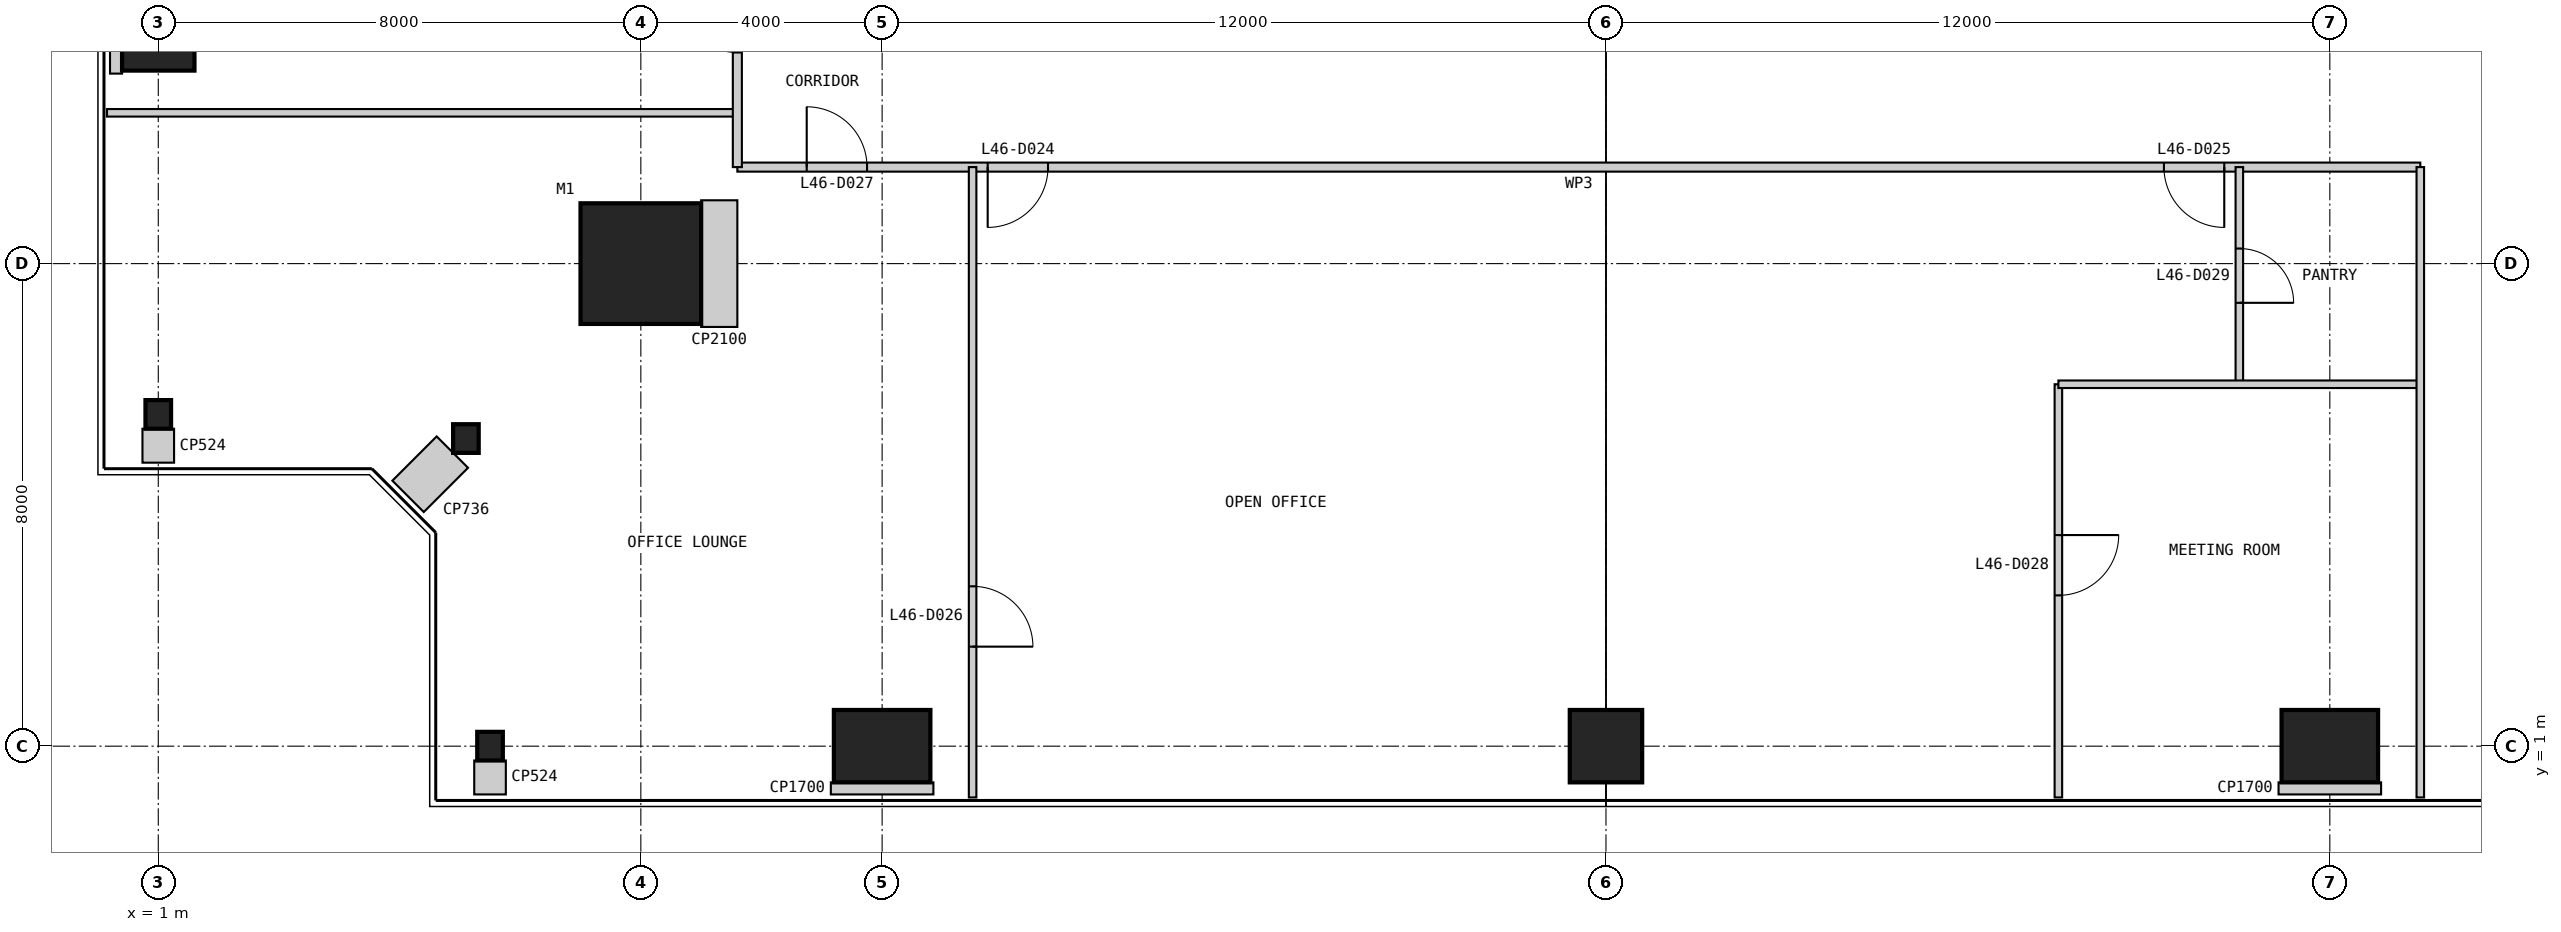
"""IFC4 building model, lengths in metres.
Left out: names, types, materials, properties, quantities, classifications, styles, units other than length and angle.
Written with IfcOpenShell. Run it as: python <this file> out.ifc"""

import sys

from ifc_helpers import new_model, si_unit, direction, frame, frame_2d, origin, origin_2d, place, context, subcontext, project, spatial, rectangle, i_section, extrude, element, fill, save


model = new_model("IFC4")
c1 = context("Model", 3, precision=1e-05, world=origin(), true_north=direction((0.0, 1.0)))
c2 = subcontext(c1, "Body", "Model", "MODEL_VIEW")
j1 = project(units=[si_unit("LENGTHUNIT", "METRE"), si_unit("PLANEANGLEUNIT", "RADIAN")], contexts=[c1])
p1 = place(None, origin())
s1 = spatial("IfcSite", under=j1, at=p1, CompositionType="ELEMENT")
p2 = place(p1, origin())
s2 = spatial("IfcBuilding", under=s1, at=p2, CompositionType="ELEMENT")
p3 = place(p2, frame((0.0, 0.0, 197.8)))
s3 = spatial("IfcBuildingStorey", under=s2, at=p3, CompositionType="ELEMENT", Elevation=197.8)
p4 = place(p3, frame((9.0, 9.0, 0.0), z_axis=(0.0, 0.0, 1.0), x_axis=(1.0, 0.0, 0.0)))
e1 = element("IfcColumn", 1, at=p4, inside=s3, PredefinedType="COLUMN", context=c2, shape_type="SweptSolid", body=[
    extrude(rectangle(XDim=2.0, YDim=2.0, at=origin_2d()), origin(), (0.0, 0.0, 1.0), 4.0),
])
p5 = place(p3, frame((6.5, 1.0, 0.0), z_axis=(0.0, 0.0, 1.0), x_axis=(1.0, 0.0, 0.0)))
e2 = element("IfcColumn", 2, at=p5, inside=s3, PredefinedType="COLUMN", context=c2, shape_type="SweptSolid", body=[
    extrude(i_section(OverallWidth=0.424, OverallDepth=0.475, WebThickness=0.048, FlangeThickness=0.077, at=origin_2d()), origin(), (0.0, 0.0, 1.0), 4.0),
])
p6 = place(p3, frame((13.0, 1.0, 0.0), z_axis=(0.0, 0.0, 1.0), x_axis=(1.0, 0.0, 0.0)))
e3 = element("IfcColumn", 3, at=p6, inside=s3, PredefinedType="COLUMN", context=c2, shape_type="SweptSolid", body=[
    extrude(rectangle(XDim=1.6, YDim=1.2, at=origin_2d()), origin(), (0.0, 0.0, 1.0), 4.0),
])
p7 = place(p3, frame((25.0, 1.0, 0.0), z_axis=(0.0, 0.0, 1.0), x_axis=(1.0, 0.0, 0.0)))
e4 = element("IfcColumn", 4, at=p7, inside=s3, PredefinedType="COLUMN", context=c2, shape_type="SweptSolid", body=[
    extrude(rectangle(XDim=1.2, YDim=1.2, at=origin_2d()), origin(), (0.0, 0.0, 1.0), 4.0),
])
p8 = place(p3, frame((37.0, 1.0, 0.0), z_axis=(0.0, 0.0, 1.0), x_axis=(1.0, 0.0, 0.0)))
e5 = element("IfcColumn", 5, at=p8, inside=s3, PredefinedType="COLUMN", context=c2, shape_type="SweptSolid", body=[
    extrude(rectangle(XDim=1.6, YDim=1.2, at=origin_2d()), origin(), (0.0, 0.0, 1.0), 4.0),
])
p9 = place(p3, frame((1.0, 13.0, 0.0), z_axis=(0.0, 0.0, 1.0), x_axis=(1.0, 0.0, 0.0)))
e6 = element("IfcColumn", 6, at=p9, inside=s3, PredefinedType="COLUMN", context=c2, shape_type="SweptSolid", body=[
    extrude(rectangle(XDim=1.2, YDim=1.6, at=origin_2d()), origin(), (0.0, 0.0, 1.0), 4.0),
])
for number, where, z_axis, x_axis in (
    (7, (1.0, 6.5, 0.0), (0.0, 0.0, 1.0), (1.0, 0.0, 0.0)),
    (8, (6.1, 6.1, 0.0), (0.0, 0.0, 1.0), (1.0, 0.0, 0.0)),
):
    element("IfcColumn", number, at=place(p3, frame(where, z_axis=z_axis, x_axis=x_axis)), inside=s3, PredefinedType="COLUMN", context=c2, shape_type="SweptSolid", body=[
        extrude(i_section(OverallWidth=0.424, OverallDepth=0.475, WebThickness=0.048, FlangeThickness=0.077, at=origin_2d()), origin(), (0.0, 0.0, 1.0), 4.0),
    ])
p10 = place(p3, frame((10.6, 10.6, 0.0), z_axis=(0.0, 0.0, 1.0), x_axis=(1.0, 0.0, 0.0)))
e9 = element("IfcWall", 9, at=p10, inside=s3, PredefinedType="PARTITIONING", context=c2, shape_type="SweptSolid", body=[
    extrude(rectangle(XDim=27.9, YDim=0.15, at=frame_2d((13.95, 0.0))), origin(), (0.0, 0.0, 1.0), 3.85),
])
p11 = place(p10, frame((4.15, 0.0, 0.0)))
e10 = element("IfcOpeningElement", 10, at=p11, cuts=e9, PredefinedType="OPENING", context=c2, shape_type="SweptSolid", body=[
    extrude(rectangle(XDim=1.0, YDim=2.2, at=frame_2d((0.5, 1.1))), frame((0.0, 0.085, 0.0), z_axis=(0.0, -1.0, 0.0), x_axis=(1.0, 0.0, 0.0)), (0.0, 0.0, 1.0), 0.17),
])
p12 = place(p10, frame((23.65, 0.0, 0.0)))
e11 = element("IfcOpeningElement", 11, at=p12, cuts=e9, PredefinedType="OPENING", context=c2, shape_type="SweptSolid", body=[
    extrude(rectangle(XDim=1.0, YDim=2.2, at=frame_2d((0.5, 1.1))), frame((0.0, 0.085, 0.0), z_axis=(0.0, -1.0, 0.0), x_axis=(1.0, 0.0, 0.0)), (0.0, 0.0, 1.0), 0.17),
])
p13 = place(p10, frame((1.15, 0.0, 0.0)))
e12 = element("IfcOpeningElement", 12, at=p13, cuts=e9, PredefinedType="OPENING", context=c2, shape_type="SweptSolid", body=[
    extrude(rectangle(XDim=1.0, YDim=2.2, at=frame_2d((0.5, 1.1))), frame((0.0, 0.085, 0.0), z_axis=(0.0, -1.0, 0.0), x_axis=(1.0, 0.0, 0.0)), (0.0, 0.0, 1.0), 0.17),
])
p14 = place(p3, frame((0.15, 11.5, 0.0), z_axis=(0.0, 0.0, 1.0), x_axis=(1.0, 0.0, 0.0)))
e13 = element("IfcWall", 13, at=p14, inside=s3, PredefinedType="PARTITIONING", context=c2, shape_type="SweptSolid", body=[
    extrude(rectangle(XDim=10.45, YDim=0.125, at=frame_2d((5.225, 0.0))), origin(), (0.0, 0.0, 1.0), 3.85),
])
p15 = place(p3, frame((14.5, 0.15, 0.0), z_axis=(0.0, 0.0, 1.0), x_axis=(0.0, 1.0, 0.0)))
e14 = element("IfcWall", 14, at=p15, inside=s3, PredefinedType="PARTITIONING", context=c2, shape_type="SweptSolid", body=[
    extrude(rectangle(XDim=10.45, YDim=0.125, at=frame_2d((5.225, 0.0))), origin(), (0.0, 0.0, 1.0), 3.85),
])
p16 = place(p15, frame((2.5, 0.0, 0.0)))
e15 = element("IfcOpeningElement", 15, at=p16, cuts=e14, PredefinedType="OPENING", context=c2, shape_type="SweptSolid", body=[
    extrude(rectangle(XDim=1.0, YDim=2.2, at=frame_2d((0.5, 1.1))), frame((0.0, 0.073, 0.0), z_axis=(0.0, -1.0, 0.0), x_axis=(1.0, 0.0, 0.0)), (0.0, 0.0, 1.0), 0.145),
])
p17 = place(p3, frame((32.5, 0.15, 0.0), z_axis=(0.0, 0.0, 1.0), x_axis=(0.0, 1.0, 0.0)))
e16 = element("IfcWall", 16, at=p17, inside=s3, PredefinedType="PARTITIONING", context=c2, shape_type="SweptSolid", body=[
    extrude(rectangle(XDim=6.85, YDim=0.125, at=frame_2d((3.425, 0.0))), origin(), (0.0, 0.0, 1.0), 3.85),
])
p18 = place(p17, frame((3.35, 0.0, 0.0)))
e17 = element("IfcOpeningElement", 17, at=p18, cuts=e16, PredefinedType="OPENING", context=c2, shape_type="SweptSolid", body=[
    extrude(rectangle(XDim=1.0, YDim=2.2, at=frame_2d((0.5, 1.1))), frame((0.0, 0.073, 0.0), z_axis=(0.0, -1.0, 0.0), x_axis=(1.0, 0.0, 0.0)), (0.0, 0.0, 1.0), 0.145),
])
p19 = place(p3, frame((35.5, 7.0, 0.0), z_axis=(0.0, 0.0, 1.0), x_axis=(0.0, 1.0, 0.0)))
e18 = element("IfcWall", 18, at=p19, inside=s3, PredefinedType="PARTITIONING", context=c2, shape_type="SweptSolid", body=[
    extrude(rectangle(XDim=3.6, YDim=0.125, at=frame_2d((1.8, 0.0))), origin(), (0.0, 0.0, 1.0), 3.85),
])
p20 = place(p19, frame((1.35, 0.0, 0.0)))
e19 = element("IfcOpeningElement", 19, at=p20, cuts=e18, PredefinedType="OPENING", context=c2, shape_type="SweptSolid", body=[
    extrude(rectangle(XDim=0.9, YDim=2.2, at=frame_2d((0.45, 1.1))), frame((0.0, 0.073, 0.0), z_axis=(0.0, -1.0, 0.0), x_axis=(1.0, 0.0, 0.0)), (0.0, 0.0, 1.0), 0.145),
])
p21 = place(p3, frame((32.5, 7.0, 0.0), z_axis=(0.0, 0.0, 1.0), x_axis=(1.0, 0.0, 0.0)))
e20 = element("IfcWall", 20, at=p21, inside=s3, PredefinedType="PARTITIONING", context=c2, shape_type="SweptSolid", body=[
    extrude(rectangle(XDim=6.0, YDim=0.125, at=frame_2d((3.0, 0.0))), origin(), (0.0, 0.0, 1.0), 3.85),
])
p22 = place(p3, frame((38.5, 0.15, 0.0), z_axis=(0.0, 0.0, 1.0), x_axis=(0.0, 1.0, 0.0)))
e21 = element("IfcWall", 21, at=p22, inside=s3, PredefinedType="PARTITIONING", context=c2, shape_type="SweptSolid", body=[
    extrude(rectangle(XDim=10.45, YDim=0.125, at=frame_2d((5.225, 0.0))), origin(), (0.0, 0.0, 1.0), 3.85),
])
p23 = place(p3, frame((10.6, 39.4, 0.0), z_axis=(0.0, 0.0, 1.0), x_axis=(0.0, -1.0, 0.0)))
e22 = element("IfcWall", 22, at=p23, inside=s3, PredefinedType="PARTITIONING", context=c2, shape_type="SweptSolid", body=[
    extrude(rectangle(XDim=28.8, YDim=0.15, at=frame_2d((14.4, 0.0))), origin(), (0.0, 0.0, 1.0), 3.85),
])
p24 = place(p23, frame((10.15, 0.0, 0.0)))
e23 = element("IfcOpeningElement", 23, at=p24, cuts=e22, PredefinedType="OPENING", context=c2, shape_type="SweptSolid", body=[
    extrude(rectangle(XDim=1.0, YDim=2.2, at=frame_2d((0.5, 1.1))), frame((0.0, 0.085, 0.0), z_axis=(0.0, -1.0, 0.0), x_axis=(1.0, 0.0, 0.0)), (0.0, 0.0, 1.0), 0.17),
])
p25 = place(p23, frame((17.65, 0.0, 0.0)))
e24 = element("IfcOpeningElement", 24, at=p25, cuts=e22, PredefinedType="OPENING", context=c2, shape_type="SweptSolid", body=[
    extrude(rectangle(XDim=1.0, YDim=2.2, at=frame_2d((0.5, 1.1))), frame((0.0, 0.085, 0.0), z_axis=(0.0, -1.0, 0.0), x_axis=(1.0, 0.0, 0.0)), (0.0, 0.0, 1.0), 0.17),
])
p26 = place(p23, frame((4.9, 0.0, 0.0)))
e25 = element("IfcOpeningElement", 25, at=p26, cuts=e22, PredefinedType="OPENING", context=c2, shape_type="SweptSolid", body=[
    extrude(rectangle(XDim=1.0, YDim=2.2, at=frame_2d((0.5, 1.1))), frame((0.0, 0.085, 0.0), z_axis=(0.0, -1.0, 0.0), x_axis=(1.0, 0.0, 0.0)), (0.0, 0.0, 1.0), 0.17),
])
p27 = place(p23, frame((22.9, 0.0, 0.0)))
e26 = element("IfcOpeningElement", 26, at=p27, cuts=e22, PredefinedType="OPENING", context=c2, shape_type="SweptSolid", body=[
    extrude(rectangle(XDim=1.0, YDim=2.2, at=frame_2d((0.5, 1.1))), frame((0.0, 0.085, 0.0), z_axis=(0.0, -1.0, 0.0), x_axis=(1.0, 0.0, 0.0)), (0.0, 0.0, 1.0), 0.17),
])
p28 = place(p23, frame((25.9, 0.0, 0.0)))
e27 = element("IfcOpeningElement", 27, at=p28, cuts=e22, PredefinedType="OPENING", context=c2, shape_type="SweptSolid", body=[
    extrude(rectangle(XDim=1.0, YDim=2.2, at=frame_2d((0.5, 1.1))), frame((0.0, 0.085, 0.0), z_axis=(0.0, -1.0, 0.0), x_axis=(1.0, 0.0, 0.0)), (0.0, 0.0, 1.0), 0.17),
])
p29 = place(p3, frame((10.6, 9.0, 0.0), z_axis=(0.0, 0.0, 1.0), x_axis=(-1.0, 0.0, 0.0)))
e28 = element("IfcWall", 28, at=p29, inside=s3, PredefinedType="PARTITIONING", context=c2, shape_type="SweptSolid", body=[
    extrude(rectangle(XDim=0.6, YDim=2.1, at=frame_2d((0.3, 0.0))), origin(), (0.0, 0.0, 1.0), 3.85),
])
p30 = place(p3, frame((6.5, 0.2, 0.0), z_axis=(0.0, 0.0, 1.0), x_axis=(0.0, 1.0, 0.0)))
e29 = element("IfcWall", 29, at=p30, inside=s3, PredefinedType="PARTITIONING", context=c2, shape_type="SweptSolid", body=[
    extrude(rectangle(XDim=0.562, YDim=0.524, at=frame_2d((0.281, 0.0))), origin(), (0.0, 0.0, 1.0), 3.85),
])
p31 = place(p3, frame((13.0, 0.2, 0.0), z_axis=(0.0, 0.0, 1.0), x_axis=(0.0, 1.0, 0.0)))
e30 = element("IfcWall", 30, at=p31, inside=s3, PredefinedType="PARTITIONING", context=c2, shape_type="SweptSolid", body=[
    extrude(rectangle(XDim=0.2, YDim=1.7, at=frame_2d((0.1, 0.0))), origin(), (0.0, 0.0, 1.0), 3.85),
])
p32 = place(p3, frame((1.0, 5.7, 0.0), z_axis=(0.0, 0.0, 1.0), x_axis=(0.0, 1.0, 0.0)))
e31 = element("IfcWall", 31, at=p32, inside=s3, PredefinedType="PARTITIONING", context=c2, shape_type="SweptSolid", body=[
    extrude(rectangle(XDim=0.562, YDim=0.524, at=frame_2d((0.281, 0.0))), origin(), (0.0, 0.0, 1.0), 3.85),
])
p33 = place(p3, frame((5.141, 5.141, 0.0), z_axis=(0.0, 0.0, 1.0), x_axis=(0.707106781187, 0.707106781187, 0.0)))
e32 = element("IfcWall", 32, at=p33, inside=s3, PredefinedType="PARTITIONING", context=c2, shape_type="SweptSolid", body=[
    extrude(rectangle(XDim=1.038, YDim=0.736, at=frame_2d((0.519, 0.0))), origin(), (0.0, 0.0, 1.0), 3.85),
])
for number, where, z_axis, x_axis in (
    (33, (37.0, 0.2, 0.0), (0.0, 0.0, 1.0), (0.0, 1.0, 0.0)),
    (34, (0.2, 13.0, 0.0), (0.0, 0.0, 1.0), (1.0, 0.0, 0.0)),
):
    element("IfcWall", number, at=place(p3, frame(where, z_axis=z_axis, x_axis=x_axis)), inside=s3, PredefinedType="PARTITIONING", context=c2, shape_type="SweptSolid", body=[
        extrude(rectangle(XDim=0.2, YDim=1.7, at=frame_2d((0.1, 0.0))), origin(), (0.0, 0.0, 1.0), 3.85),
    ])
p34 = place(p11, frame((1.0, 0.0, 0.0), z_axis=(0.0, 0.0, 1.0), x_axis=(-1.0, 0.0, 0.0)))
e35 = element("IfcDoor", 35, at=p34, inside=s3, OperationType="SINGLE_SWING_RIGHT", PredefinedType="DOOR", context=c2, shape_type="SweptSolid", body=[
    extrude(rectangle(XDim=1.0, YDim=2.2, at=frame_2d((0.5, 1.1))), frame((0.0, 0.025, 0.0), z_axis=(0.0, -1.0, 0.0), x_axis=(1.0, 0.0, 0.0)), (0.0, 0.0, 1.0), 0.05),
])
fill(e10, e35)
p35 = place(p12, frame((1.0, 0.0, 0.0), z_axis=(0.0, 0.0, 1.0), x_axis=(-1.0, 0.0, 0.0)))
e36 = element("IfcDoor", 36, at=p35, inside=s3, OperationType="SINGLE_SWING_LEFT", PredefinedType="DOOR", context=c2, shape_type="SweptSolid", body=[
    extrude(rectangle(XDim=1.0, YDim=2.2, at=frame_2d((0.5, 1.1))), frame((0.0, 0.025, 0.0), z_axis=(0.0, -1.0, 0.0), x_axis=(1.0, 0.0, 0.0)), (0.0, 0.0, 1.0), 0.05),
])
fill(e11, e36)
p36 = place(p16, frame((1.0, 0.0, 0.0), z_axis=(0.0, 0.0, 1.0), x_axis=(-1.0, 0.0, 0.0)))
e37 = element("IfcDoor", 37, at=p36, inside=s3, OperationType="SINGLE_SWING_RIGHT", PredefinedType="DOOR", context=c2, shape_type="SweptSolid", body=[
    extrude(rectangle(XDim=1.0, YDim=2.2, at=frame_2d((0.5, 1.1))), frame((0.0, 0.025, 0.0), z_axis=(0.0, -1.0, 0.0), x_axis=(1.0, 0.0, 0.0)), (0.0, 0.0, 1.0), 0.05),
])
fill(e15, e37)
p37 = place(p13, origin())
e38 = element("IfcDoor", 38, at=p37, inside=s3, OperationType="SINGLE_SWING_LEFT", PredefinedType="DOOR", context=c2, shape_type="SweptSolid", body=[
    extrude(rectangle(XDim=1.0, YDim=2.2, at=frame_2d((0.5, 1.1))), frame((0.0, 0.025, 0.0), z_axis=(0.0, -1.0, 0.0), x_axis=(1.0, 0.0, 0.0)), (0.0, 0.0, 1.0), 0.05),
])
fill(e12, e38)
p38 = place(p18, frame((1.0, 0.0, 0.0), z_axis=(0.0, 0.0, 1.0), x_axis=(-1.0, 0.0, 0.0)))
e39 = element("IfcDoor", 39, at=p38, inside=s3, OperationType="SINGLE_SWING_LEFT", PredefinedType="DOOR", context=c2, shape_type="SweptSolid", body=[
    extrude(rectangle(XDim=1.0, YDim=2.2, at=frame_2d((0.5, 1.1))), frame((0.0, 0.025, 0.0), z_axis=(0.0, -1.0, 0.0), x_axis=(1.0, 0.0, 0.0)), (0.0, 0.0, 1.0), 0.05),
])
fill(e17, e39)
p39 = place(p20, frame((0.9, 0.0, 0.0), z_axis=(0.0, 0.0, 1.0), x_axis=(-1.0, 0.0, 0.0)))
e40 = element("IfcDoor", 40, at=p39, inside=s3, OperationType="SINGLE_SWING_RIGHT", PredefinedType="DOOR", context=c2, shape_type="SweptSolid", body=[
    extrude(rectangle(XDim=0.9, YDim=2.2, at=frame_2d((0.45, 1.1))), frame((0.0, 0.025, 0.0), z_axis=(0.0, -1.0, 0.0), x_axis=(1.0, 0.0, 0.0)), (0.0, 0.0, 1.0), 0.05),
])
fill(e19, e40)
save(model, sys.argv[1])
